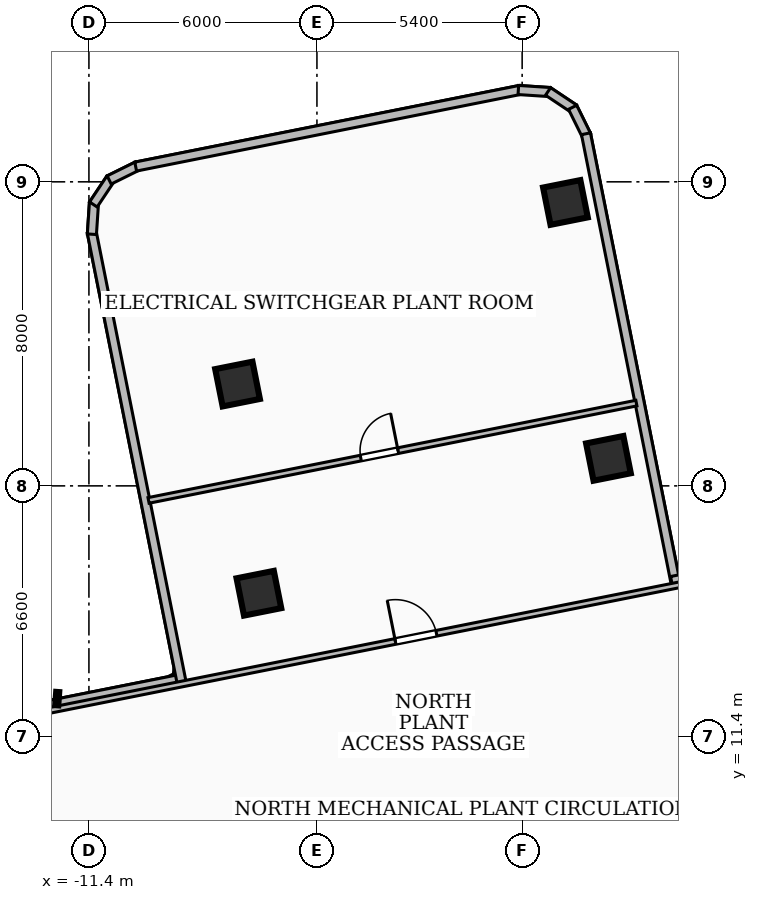
"""IFC4 building model, lengths in metres.
Left out: names, types, materials, properties, quantities, classifications, styles, units other than length and angle.
Written with IfcOpenShell. Run it as: python <this file> out.ifc"""

import sys

from ifc_helpers import new_model, si_unit, direction, frame, frame_2d, origin, origin_2d, place, context, subcontext, project, spatial, rectangle, extrude, element, fill, save


model = new_model("IFC4")
c1 = context("Model", 3, precision=1e-05, world=origin(), true_north=direction((0.0, 1.0)))
c2 = subcontext(c1, "Body", "Model", "MODEL_VIEW")
j1 = project(units=[si_unit("LENGTHUNIT", "METRE"), si_unit("PLANEANGLEUNIT", "RADIAN")], contexts=[c1])
p1 = place(None, origin())
s1 = spatial("IfcSite", under=j1, at=p1, CompositionType="ELEMENT")
p2 = place(p1, origin())
s2 = spatial("IfcBuilding", under=s1, at=p2, CompositionType="ELEMENT")
p3 = place(p2, frame((0.0, 0.0, 107.28)))
s3 = spatial("IfcBuildingStorey", under=s2, at=p3, CompositionType="ELEMENT", Elevation=107.28)
for number, where, z_axis, x_axis in (
    (1, (2.271, 18.724, 0.0), (0.0, 0.0, 1.0), (0.981, 0.196, 0.0)),
    (2, (-6.927, 15.175, 0.0), (0.0, 0.0, 1.0), (0.981, 0.196, 0.0)),
    (3, (1.139, 25.457, 0.0), (0.0, 0.0, 1.0), (0.981, 0.196, 0.0)),
    (4, (-7.489, 20.679, 0.0), (0.0, 0.0, 1.0), (0.981, 0.196, 0.0)),
):
    element("IfcColumn", number, at=place(p3, frame(where, z_axis=z_axis, x_axis=x_axis)), inside=s3, PredefinedType="COLUMN", context=c2, shape_type="SweptSolid", body=[
        extrude(rectangle(XDim=1.0, YDim=1.0, at=origin_2d()), origin(), (0.0, 0.0, 1.0), 4.68),
    ])
p4 = place(p3, frame((-15.532, 11.616, 0.0), z_axis=(0.0, 0.0, 1.0), x_axis=(0.980667882289, 0.195679596911, 0.0)))
e5 = element("IfcWall", 5, at=p4, inside=s3, PredefinedType="SOLIDWALL", context=c2, shape_type="SweptSolid", body=[
    extrude(rectangle(XDim=6.776, YDim=0.24, at=frame_2d((3.388, 0.0))), origin(), (0.0, 0.0, 1.0), 2.212),
])
p5 = place(p3, frame((-8.962, 12.829, 0.0), z_axis=(0.0, 0.0, 1.0), x_axis=(-0.195692311479, 0.980665345176, 0.0)))
e6 = element("IfcWall", 6, at=p5, inside=s3, PredefinedType="SOLIDWALL", context=c2, shape_type="SweptSolid", body=[
    extrude(rectangle(XDim=12.075, YDim=0.24, at=frame_2d((6.038, 0.0))), origin(), (0.0, 0.0, 1.0), 2.212),
])
p6 = place(p3, frame((-11.322, 24.621, 0.0), z_axis=(0.0, 0.0, 1.0), x_axis=(0.066128864644, 0.997811090969, 0.0)))
e7 = element("IfcWall", 7, at=p6, inside=s3, PredefinedType="SOLIDWALL", context=c2, shape_type="SweptSolid", body=[
    extrude(rectangle(XDim=0.831, YDim=0.24, at=frame_2d((0.415, 0.0))), origin(), (0.0, 0.0, 1.0), 4.42),
])
p7 = place(p3, frame((-11.283, 25.404, 0.0), z_axis=(0.0, 0.0, 1.0), x_axis=(0.555184616867, 0.831727143475, 0.0)))
e8 = element("IfcWall", 8, at=p7, inside=s3, PredefinedType="SOLIDWALL", context=c2, shape_type="SweptSolid", body=[
    extrude(rectangle(XDim=0.814, YDim=0.24, at=frame_2d((0.407, 0.0))), origin(), (0.0, 0.0, 1.0), 4.42),
])
p8 = place(p3, frame((-10.867, 26.049, 0.0), z_axis=(0.0, 0.0, 1.0), x_axis=(0.896360336363, 0.443326231342, 0.0)))
e9 = element("IfcWall", 9, at=p8, inside=s3, PredefinedType="SOLIDWALL", context=c2, shape_type="SweptSolid", body=[
    extrude(rectangle(XDim=0.83, YDim=0.24, at=frame_2d((0.415, 0.0))), origin(), (0.0, 0.0, 1.0), 4.42),
])
p9 = place(p3, frame((-10.17, 26.401, 0.0), z_axis=(0.0, 0.0, 1.0), x_axis=(0.980690626655, 0.195565576703, 0.0)))
e10 = element("IfcWall", 10, at=p9, inside=s3, PredefinedType="SOLIDWALL", context=c2, shape_type="SweptSolid", body=[
    extrude(rectangle(XDim=10.319, YDim=0.24, at=frame_2d((5.16, 0.0))), origin(), (0.0, 0.0, 1.0), 4.42),
])
p10 = place(p3, frame((-0.1, 28.416, 0.0), z_axis=(0.0, 0.0, 1.0), x_axis=(0.99788425717, -0.065015454255, 0.0)))
e11 = element("IfcWall", 11, at=p10, inside=s3, PredefinedType="SOLIDWALL", context=c2, shape_type="SweptSolid", body=[
    extrude(rectangle(XDim=0.83, YDim=0.24, at=frame_2d((0.415, 0.0))), origin(), (0.0, 0.0, 1.0), 4.42),
])
p11 = place(p3, frame((0.682, 28.378, 0.0), z_axis=(0.0, 0.0, 1.0), x_axis=(0.831635556852, -0.555321799122, 0.0)))
e12 = element("IfcWall", 12, at=p11, inside=s3, PredefinedType="SOLIDWALL", context=c2, shape_type="SweptSolid", body=[
    extrude(rectangle(XDim=0.815, YDim=0.24, at=frame_2d((0.408, 0.0))), origin(), (0.0, 0.0, 1.0), 4.42),
])
p12 = place(p3, frame((1.328, 27.961, 0.0), z_axis=(0.0, 0.0, 1.0), x_axis=(0.443084385006, -0.896479909292, 0.0)))
e13 = element("IfcWall", 13, at=p12, inside=s3, PredefinedType="SOLIDWALL", context=c2, shape_type="SweptSolid", body=[
    extrude(rectangle(XDim=0.829, YDim=0.24, at=frame_2d((0.414, 0.0))), origin(), (0.0, 0.0, 1.0), 4.42),
])
p13 = place(p3, frame((1.679, 27.265, 0.0), z_axis=(0.0, 0.0, 1.0), x_axis=(0.195676792465, -0.980668441875, 0.0)))
e14 = element("IfcWall", 14, at=p13, inside=s3, PredefinedType="SOLIDWALL", context=c2, shape_type="SweptSolid", body=[
    extrude(rectangle(XDim=12.076, YDim=0.24, at=frame_2d((6.038, 0.0))), origin(), (0.0, 0.0, 1.0), 2.212),
])
p14 = place(p3, frame((3.929, 15.497, 0.0), z_axis=(0.0, 0.0, 1.0), x_axis=(0.98066404714, 0.19569881616, 0.0)))
e15 = element("IfcWall", 15, at=p14, inside=s3, PredefinedType="SOLIDWALL", context=c2, shape_type="SweptSolid", body=[
    extrude(rectangle(XDim=6.075, YDim=0.24, at=frame_2d((3.038, 0.0))), origin(), (0.0, 0.0, 1.0), 2.212),
])
p15 = place(p3, frame((-13.24, 11.931, 0.0), z_axis=(0.0, 0.0, 1.0), x_axis=(0.980688099455, 0.19557824927, 0.0)))
e16 = element("IfcWall", 16, at=p15, inside=s3, PredefinedType="PARTITIONING", context=c2, shape_type="SweptSolid", body=[
    extrude(rectangle(XDim=20.601, YDim=0.15, at=frame_2d((10.3, 0.0))), origin(), (0.0, 0.0, 1.0), 2.212),
])
p16 = place(p15, frame((10.1, 0.0, 0.0)))
e17 = element("IfcOpeningElement", 17, at=p16, cuts=e16, PredefinedType="OPENING", context=c2, shape_type="SweptSolid", body=[
    extrude(rectangle(XDim=1.1, YDim=2.15, at=frame_2d((0.55, 1.075))), frame((0.0, 0.085, 0.0), z_axis=(0.0, -1.0, 0.0), x_axis=(1.0, 0.0, 0.0)), (0.0, 0.0, 1.0), 0.17),
])
p17 = place(p3, frame((-9.831, 17.617, 0.0), z_axis=(0.0, 0.0, 1.0), x_axis=(0.980674534157, 0.195646257456, 0.0)))
e18 = element("IfcWall", 18, at=p17, inside=s3, PredefinedType="PARTITIONING", context=c2, shape_type="SweptSolid", body=[
    extrude(rectangle(XDim=13.09, YDim=0.15, at=frame_2d((6.545, 0.0))), origin(), (0.0, 0.0, 1.0), 2.212),
])
p18 = place(p17, frame((5.695, 0.0, 0.0)))
e19 = element("IfcOpeningElement", 19, at=p18, cuts=e18, PredefinedType="OPENING", context=c2, shape_type="SweptSolid", body=[
    extrude(rectangle(XDim=1.0, YDim=2.1, at=frame_2d((0.5, 1.05))), frame((0.0, 0.085, 0.0), z_axis=(0.0, -1.0, 0.0), x_axis=(1.0, 0.0, 0.0)), (0.0, 0.0, 1.0), 0.17),
])
p19 = place(p16, origin())
e20 = element("IfcDoor", 20, at=p19, inside=s3, OperationType="SINGLE_SWING_LEFT", PredefinedType="DOOR", context=c2, shape_type="SweptSolid", body=[
    extrude(rectangle(XDim=1.1, YDim=2.15, at=frame_2d((0.55, 1.075))), frame((0.0, 0.025, 0.0), z_axis=(0.0, -1.0, 0.0), x_axis=(1.0, 0.0, 0.0)), (0.0, 0.0, 1.0), 0.05),
])
fill(e17, e20)
p20 = place(p18, origin())
e21 = element("IfcDoor", 21, at=p20, inside=s3, OperationType="SINGLE_SWING_RIGHT", PredefinedType="DOOR", context=c2, shape_type="SweptSolid", body=[
    extrude(rectangle(XDim=1.0, YDim=2.1, at=frame_2d((0.5, 1.05))), frame((0.0, 0.025, 0.0), z_axis=(0.0, -1.0, 0.0), x_axis=(1.0, 0.0, 0.0)), (0.0, 0.0, 1.0), 0.05),
])
fill(e19, e21)
save(model, sys.argv[1])
